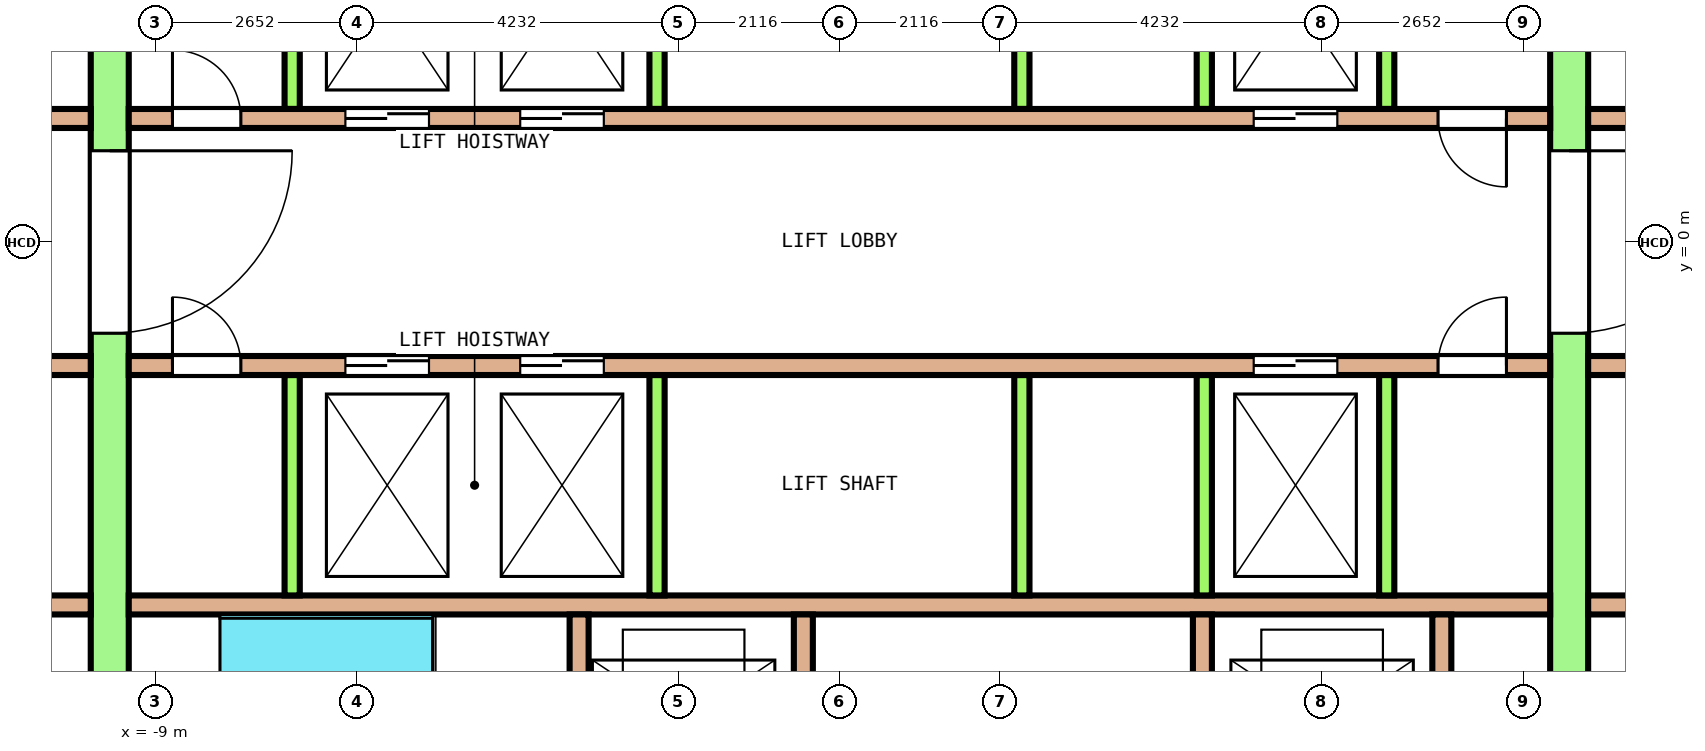
"""IFC4 building model, lengths in metres.
Left out: names, types, materials, properties, quantities, classifications, styles, units other than length and angle.
Written with IfcOpenShell. Run it as: python <this file> out.ifc"""

import sys

from ifc_helpers import new_model, si_unit, direction, frame, frame_2d, origin, place, context, subcontext, project, spatial, rectangle, extrude, element, fill, save


model = new_model("IFC4")
c1 = context("Model", 3, precision=1e-05, world=origin(), true_north=direction((0.0, 1.0)))
c2 = subcontext(c1, "Body", "Model", "MODEL_VIEW")
j1 = project(units=[si_unit("LENGTHUNIT", "METRE"), si_unit("PLANEANGLEUNIT", "RADIAN")], contexts=[c1])
p1 = place(None, origin())
s1 = spatial("IfcSite", under=j1, at=p1, CompositionType="ELEMENT")
p2 = place(p1, origin())
s2 = spatial("IfcBuilding", under=s1, at=p2, CompositionType="ELEMENT")
p3 = place(p2, frame((0.0, 0.0, 211.4)))
s3 = spatial("IfcBuildingStorey", under=s2, at=p3, CompositionType="ELEMENT", Elevation=211.4)
p4 = place(p3, frame((-9.6, -7.8, 0.0), z_axis=(0.0, 0.0, 1.0), x_axis=(0.0, 1.0, 0.0)))
e1 = element("IfcWall", 1, at=p4, inside=s3, PredefinedType="SHEAR", context=c2, shape_type="SweptSolid", body=[
    extrude(rectangle(XDim=15.6, YDim=0.5, at=frame_2d((7.8, 0.0))), origin(), (0.0, 0.0, 1.0), 3.7),
])
p5 = place(p4, frame((6.6, 0.0, 0.0)))
e2 = element("IfcOpeningElement", 2, at=p5, cuts=e1, PredefinedType="OPENING", context=c2, shape_type="SweptSolid", body=[
    extrude(rectangle(XDim=2.4, YDim=2.1, at=frame_2d((1.2, 1.05))), frame((0.0, 0.26, 0.0), z_axis=(0.0, -1.0, 0.0), x_axis=(1.0, 0.0, 0.0)), (0.0, 0.0, 1.0), 0.52),
])
p6 = place(p4, frame((13.5, 0.0, 0.0)))
e3 = element("IfcOpeningElement", 3, at=p6, cuts=e1, PredefinedType="OPENING", context=c2, shape_type="SweptSolid", body=[
    extrude(rectangle(XDim=1.2, YDim=2.1, at=frame_2d((0.6, 1.05))), frame((0.0, 0.26, 0.0), z_axis=(0.0, -1.0, 0.0), x_axis=(1.0, 0.0, 0.0)), (0.0, 0.0, 1.0), 0.52),
])
p7 = place(p4, frame((0.9, 0.0, 0.0)))
e4 = element("IfcOpeningElement", 4, at=p7, cuts=e1, PredefinedType="OPENING", context=c2, shape_type="SweptSolid", body=[
    extrude(rectangle(XDim=1.2, YDim=2.1, at=frame_2d((0.6, 1.05))), frame((0.0, 0.26, 0.0), z_axis=(0.0, -1.0, 0.0), x_axis=(1.0, 0.0, 0.0)), (0.0, 0.0, 1.0), 0.52),
])
p8 = place(p3, frame((9.6, -7.8, 0.0), z_axis=(0.0, 0.0, 1.0), x_axis=(0.0, 1.0, 0.0)))
e5 = element("IfcWall", 5, at=p8, inside=s3, PredefinedType="SHEAR", context=c2, shape_type="SweptSolid", body=[
    extrude(rectangle(XDim=15.6, YDim=0.5, at=frame_2d((7.8, 0.0))), origin(), (0.0, 0.0, 1.0), 3.7),
])
p9 = place(p8, frame((6.6, 0.0, 0.0)))
e6 = element("IfcOpeningElement", 6, at=p9, cuts=e5, PredefinedType="OPENING", context=c2, shape_type="SweptSolid", body=[
    extrude(rectangle(XDim=2.4, YDim=2.1, at=frame_2d((1.2, 1.05))), frame((0.0, 0.26, 0.0), z_axis=(0.0, -1.0, 0.0), x_axis=(1.0, 0.0, 0.0)), (0.0, 0.0, 1.0), 0.52),
])
p10 = place(p8, frame((13.5, 0.0, 0.0)))
e7 = element("IfcOpeningElement", 7, at=p10, cuts=e5, PredefinedType="OPENING", context=c2, shape_type="SweptSolid", body=[
    extrude(rectangle(XDim=1.2, YDim=2.1, at=frame_2d((0.6, 1.05))), frame((0.0, 0.26, 0.0), z_axis=(0.0, -1.0, 0.0), x_axis=(1.0, 0.0, 0.0)), (0.0, 0.0, 1.0), 0.52),
])
p11 = place(p8, frame((1.0, 0.0, 0.0)))
e8 = element("IfcOpeningElement", 8, at=p11, cuts=e5, PredefinedType="OPENING", context=c2, shape_type="SweptSolid", body=[
    extrude(rectangle(XDim=1.0, YDim=2.1, at=frame_2d((0.5, 1.05))), frame((0.0, 0.26, 0.0), z_axis=(0.0, -1.0, 0.0), x_axis=(1.0, 0.0, 0.0)), (0.0, 0.0, 1.0), 0.52),
])
p12 = place(p3, frame((-12.9, 1.625, 0.0), z_axis=(0.0, 0.0, 1.0), x_axis=(1.0, 0.0, 0.0)))
e9 = element("IfcWall", 9, at=p12, inside=s3, PredefinedType="SOLIDWALL", context=c2, shape_type="SweptSolid", body=[
    extrude(rectangle(XDim=3.05, YDim=0.25, at=frame_2d((1.525, 0.0))), origin(), (0.0, 0.0, 1.0), 3.7),
])
p13 = place(p12, frame((1.075, 0.0, 0.0)))
e10 = element("IfcOpeningElement", 10, at=p13, cuts=e9, PredefinedType="OPENING", context=c2, shape_type="SweptSolid", body=[
    extrude(rectangle(XDim=0.9, YDim=2.1, at=frame_2d((0.45, 1.05))), frame((0.0, 0.135, 0.0), z_axis=(0.0, -1.0, 0.0), x_axis=(1.0, 0.0, 0.0)), (0.0, 0.0, 1.0), 0.27),
])
p14 = place(p3, frame((-9.35, 1.625, 0.0), z_axis=(0.0, 0.0, 1.0), x_axis=(1.0, 0.0, 0.0)))
e11 = element("IfcWall", 11, at=p14, inside=s3, PredefinedType="SOLIDWALL", context=c2, shape_type="SweptSolid", body=[
    extrude(rectangle(XDim=18.7, YDim=0.25, at=frame_2d((9.35, 0.0))), origin(), (0.0, 0.0, 1.0), 3.7),
])
p15 = place(p14, frame((2.85, 0.0, 0.0)))
e12 = element("IfcOpeningElement", 12, at=p15, cuts=e11, PredefinedType="OPENING", context=c2, shape_type="SweptSolid", body=[
    extrude(rectangle(XDim=1.1, YDim=2.1, at=frame_2d((0.55, 1.05))), frame((0.0, 0.135, 0.0), z_axis=(0.0, -1.0, 0.0), x_axis=(1.0, 0.0, 0.0)), (0.0, 0.0, 1.0), 0.27),
])
p16 = place(p14, frame((5.15, 0.0, 0.0)))
e13 = element("IfcOpeningElement", 13, at=p16, cuts=e11, PredefinedType="OPENING", context=c2, shape_type="SweptSolid", body=[
    extrude(rectangle(XDim=1.1, YDim=2.1, at=frame_2d((0.55, 1.05))), frame((0.0, 0.135, 0.0), z_axis=(0.0, -1.0, 0.0), x_axis=(1.0, 0.0, 0.0)), (0.0, 0.0, 1.0), 0.27),
])
p17 = place(p14, frame((14.8, 0.0, 0.0)))
e14 = element("IfcOpeningElement", 14, at=p17, cuts=e11, PredefinedType="OPENING", context=c2, shape_type="SweptSolid", body=[
    extrude(rectangle(XDim=1.1, YDim=2.1, at=frame_2d((0.55, 1.05))), frame((0.0, 0.135, 0.0), z_axis=(0.0, -1.0, 0.0), x_axis=(1.0, 0.0, 0.0)), (0.0, 0.0, 1.0), 0.27),
])
p18 = place(p14, frame((0.575, 0.0, 0.0)))
e15 = element("IfcOpeningElement", 15, at=p18, cuts=e11, PredefinedType="OPENING", context=c2, shape_type="SweptSolid", body=[
    extrude(rectangle(XDim=0.9, YDim=2.1, at=frame_2d((0.45, 1.05))), frame((0.0, 0.135, 0.0), z_axis=(0.0, -1.0, 0.0), x_axis=(1.0, 0.0, 0.0)), (0.0, 0.0, 1.0), 0.27),
])
p19 = place(p14, frame((17.225, 0.0, 0.0)))
e16 = element("IfcOpeningElement", 16, at=p19, cuts=e11, PredefinedType="OPENING", context=c2, shape_type="SweptSolid", body=[
    extrude(rectangle(XDim=0.9, YDim=2.1, at=frame_2d((0.45, 1.05))), frame((0.0, 0.135, 0.0), z_axis=(0.0, -1.0, 0.0), x_axis=(1.0, 0.0, 0.0)), (0.0, 0.0, 1.0), 0.27),
])
p20 = place(p3, frame((9.85, 1.625, 0.0), z_axis=(0.0, 0.0, 1.0), x_axis=(1.0, 0.0, 0.0)))
e17 = element("IfcWall", 17, at=p20, inside=s3, PredefinedType="SOLIDWALL", context=c2, shape_type="SweptSolid", body=[
    extrude(rectangle(XDim=3.05, YDim=0.25, at=frame_2d((1.525, 0.0))), origin(), (0.0, 0.0, 1.0), 3.7),
])
p21 = place(p20, frame((1.075, 0.0, 0.0)))
e18 = element("IfcOpeningElement", 18, at=p21, cuts=e17, PredefinedType="OPENING", context=c2, shape_type="SweptSolid", body=[
    extrude(rectangle(XDim=0.9, YDim=2.1, at=frame_2d((0.45, 1.05))), frame((0.0, 0.135, 0.0), z_axis=(0.0, -1.0, 0.0), x_axis=(1.0, 0.0, 0.0)), (0.0, 0.0, 1.0), 0.27),
])
for number, where, z_axis, x_axis in (
    (19, (-7.2, 1.75, 0.0), (0.0, 0.0, 1.0), (0.0, 1.0, 0.0)),
    (20, (-2.4, 1.75, 0.0), (0.0, 0.0, 1.0), (0.0, 1.0, 0.0)),
    (21, (2.4, 1.75, 0.0), (0.0, 0.0, 1.0), (0.0, 1.0, 0.0)),
    (22, (4.8, 1.75, 0.0), (0.0, 0.0, 1.0), (0.0, 1.0, 0.0)),
    (23, (7.2, 1.75, 0.0), (0.0, 0.0, 1.0), (0.0, 1.0, 0.0)),
):
    element("IfcWall", number, at=place(p3, frame(where, z_axis=z_axis, x_axis=x_axis)), inside=s3, PredefinedType="SOLIDWALL", context=c2, shape_type="SweptSolid", body=[
        extrude(rectangle(XDim=2.9, YDim=0.2, at=frame_2d((1.45, 0.0))), origin(), (0.0, 0.0, 1.0), 3.7),
    ])
p22 = place(p3, frame((-12.9, -1.625, 0.0), z_axis=(0.0, 0.0, 1.0), x_axis=(1.0, 0.0, 0.0)))
e24 = element("IfcWall", 24, at=p22, inside=s3, PredefinedType="SOLIDWALL", context=c2, shape_type="SweptSolid", body=[
    extrude(rectangle(XDim=3.05, YDim=0.25, at=frame_2d((1.525, 0.0))), origin(), (0.0, 0.0, 1.0), 3.7),
])
p23 = place(p22, frame((1.075, 0.0, 0.0)))
e25 = element("IfcOpeningElement", 25, at=p23, cuts=e24, PredefinedType="OPENING", context=c2, shape_type="SweptSolid", body=[
    extrude(rectangle(XDim=0.9, YDim=2.1, at=frame_2d((0.45, 1.05))), frame((0.0, 0.135, 0.0), z_axis=(0.0, -1.0, 0.0), x_axis=(1.0, 0.0, 0.0)), (0.0, 0.0, 1.0), 0.27),
])
p24 = place(p3, frame((-9.35, -1.625, 0.0), z_axis=(0.0, 0.0, 1.0), x_axis=(1.0, 0.0, 0.0)))
e26 = element("IfcWall", 26, at=p24, inside=s3, PredefinedType="SOLIDWALL", context=c2, shape_type="SweptSolid", body=[
    extrude(rectangle(XDim=18.7, YDim=0.25, at=frame_2d((9.35, 0.0))), origin(), (0.0, 0.0, 1.0), 3.7),
])
p25 = place(p24, frame((2.85, 0.0, 0.0)))
e27 = element("IfcOpeningElement", 27, at=p25, cuts=e26, PredefinedType="OPENING", context=c2, shape_type="SweptSolid", body=[
    extrude(rectangle(XDim=1.1, YDim=2.1, at=frame_2d((0.55, 1.05))), frame((0.0, 0.135, 0.0), z_axis=(0.0, -1.0, 0.0), x_axis=(1.0, 0.0, 0.0)), (0.0, 0.0, 1.0), 0.27),
])
p26 = place(p24, frame((5.15, 0.0, 0.0)))
e28 = element("IfcOpeningElement", 28, at=p26, cuts=e26, PredefinedType="OPENING", context=c2, shape_type="SweptSolid", body=[
    extrude(rectangle(XDim=1.1, YDim=2.1, at=frame_2d((0.55, 1.05))), frame((0.0, 0.135, 0.0), z_axis=(0.0, -1.0, 0.0), x_axis=(1.0, 0.0, 0.0)), (0.0, 0.0, 1.0), 0.27),
])
p27 = place(p24, frame((14.8, 0.0, 0.0)))
e29 = element("IfcOpeningElement", 29, at=p27, cuts=e26, PredefinedType="OPENING", context=c2, shape_type="SweptSolid", body=[
    extrude(rectangle(XDim=1.1, YDim=2.1, at=frame_2d((0.55, 1.05))), frame((0.0, 0.135, 0.0), z_axis=(0.0, -1.0, 0.0), x_axis=(1.0, 0.0, 0.0)), (0.0, 0.0, 1.0), 0.27),
])
p28 = place(p24, frame((0.575, 0.0, 0.0)))
e30 = element("IfcOpeningElement", 30, at=p28, cuts=e26, PredefinedType="OPENING", context=c2, shape_type="SweptSolid", body=[
    extrude(rectangle(XDim=0.9, YDim=2.1, at=frame_2d((0.45, 1.05))), frame((0.0, 0.135, 0.0), z_axis=(0.0, -1.0, 0.0), x_axis=(1.0, 0.0, 0.0)), (0.0, 0.0, 1.0), 0.27),
])
p29 = place(p24, frame((17.225, 0.0, 0.0)))
e31 = element("IfcOpeningElement", 31, at=p29, cuts=e26, PredefinedType="OPENING", context=c2, shape_type="SweptSolid", body=[
    extrude(rectangle(XDim=0.9, YDim=2.1, at=frame_2d((0.45, 1.05))), frame((0.0, 0.135, 0.0), z_axis=(0.0, -1.0, 0.0), x_axis=(1.0, 0.0, 0.0)), (0.0, 0.0, 1.0), 0.27),
])
p30 = place(p3, frame((9.85, -1.625, 0.0), z_axis=(0.0, 0.0, 1.0), x_axis=(1.0, 0.0, 0.0)))
e32 = element("IfcWall", 32, at=p30, inside=s3, PredefinedType="SOLIDWALL", context=c2, shape_type="SweptSolid", body=[
    extrude(rectangle(XDim=3.05, YDim=0.25, at=frame_2d((1.525, 0.0))), origin(), (0.0, 0.0, 1.0), 3.7),
])
p31 = place(p30, frame((1.075, 0.0, 0.0)))
e33 = element("IfcOpeningElement", 33, at=p31, cuts=e32, PredefinedType="OPENING", context=c2, shape_type="SweptSolid", body=[
    extrude(rectangle(XDim=0.9, YDim=2.1, at=frame_2d((0.45, 1.05))), frame((0.0, 0.135, 0.0), z_axis=(0.0, -1.0, 0.0), x_axis=(1.0, 0.0, 0.0)), (0.0, 0.0, 1.0), 0.27),
])
p32 = place(p3, frame((-12.9, -4.775, 0.0), z_axis=(0.0, 0.0, 1.0), x_axis=(1.0, 0.0, 0.0)))
e34 = element("IfcWall", 34, at=p32, inside=s3, PredefinedType="SOLIDWALL", context=c2, shape_type="SweptSolid", body=[
    extrude(rectangle(XDim=3.05, YDim=0.25, at=frame_2d((1.525, 0.0))), origin(), (0.0, 0.0, 1.0), 3.7),
])
p33 = place(p3, frame((-9.35, -4.775, 0.0), z_axis=(0.0, 0.0, 1.0), x_axis=(1.0, 0.0, 0.0)))
e35 = element("IfcWall", 35, at=p33, inside=s3, PredefinedType="SOLIDWALL", context=c2, shape_type="SweptSolid", body=[
    extrude(rectangle(XDim=18.7, YDim=0.25, at=frame_2d((9.35, 0.0))), origin(), (0.0, 0.0, 1.0), 3.7),
])
p34 = place(p3, frame((9.85, -4.775, 0.0), z_axis=(0.0, 0.0, 1.0), x_axis=(1.0, 0.0, 0.0)))
e36 = element("IfcWall", 36, at=p34, inside=s3, PredefinedType="SOLIDWALL", context=c2, shape_type="SweptSolid", body=[
    extrude(rectangle(XDim=3.05, YDim=0.25, at=frame_2d((1.525, 0.0))), origin(), (0.0, 0.0, 1.0), 3.7),
])
for number, where, z_axis, x_axis in (
    (37, (-7.2, -4.65, 0.0), (0.0, 0.0, 1.0), (0.0, 1.0, 0.0)),
    (38, (-2.4, -4.65, 0.0), (0.0, 0.0, 1.0), (0.0, 1.0, 0.0)),
    (39, (2.4, -4.65, 0.0), (0.0, 0.0, 1.0), (0.0, 1.0, 0.0)),
    (40, (4.8, -4.65, 0.0), (0.0, 0.0, 1.0), (0.0, 1.0, 0.0)),
    (41, (7.2, -4.65, 0.0), (0.0, 0.0, 1.0), (0.0, 1.0, 0.0)),
):
    element("IfcWall", number, at=place(p3, frame(where, z_axis=z_axis, x_axis=x_axis)), inside=s3, PredefinedType="SOLIDWALL", context=c2, shape_type="SweptSolid", body=[
        extrude(rectangle(XDim=2.9, YDim=0.2, at=frame_2d((1.45, 0.0))), origin(), (0.0, 0.0, 1.0), 3.7),
    ])
p35 = place(p3, frame((-3.425, -7.8, 0.0), z_axis=(0.0, 0.0, 1.0), x_axis=(0.0, 1.0, 0.0)))
e42 = element("IfcWall", 42, at=p35, inside=s3, PredefinedType="SOLIDWALL", context=c2, shape_type="SweptSolid", body=[
    extrude(rectangle(XDim=2.9, YDim=0.25, at=frame_2d((1.45, 0.0))), origin(), (0.0, 0.0, 1.0), 3.7),
])
p36 = place(p3, frame((-0.475, -7.8, 0.0), z_axis=(0.0, 0.0, 1.0), x_axis=(0.0, 1.0, 0.0)))
e43 = element("IfcWall", 43, at=p36, inside=s3, PredefinedType="SOLIDWALL", context=c2, shape_type="SweptSolid", body=[
    extrude(rectangle(XDim=2.9, YDim=0.25, at=frame_2d((1.45, 0.0))), origin(), (0.0, 0.0, 1.0), 3.7),
])
p37 = place(p36, frame((0.9, 0.0, 0.0)))
e44 = element("IfcOpeningElement", 44, at=p37, cuts=e43, PredefinedType="OPENING", context=c2, shape_type="SweptSolid", body=[
    extrude(rectangle(XDim=1.1, YDim=2.1, at=frame_2d((0.55, 1.05))), frame((0.0, 0.135, 0.0), z_axis=(0.0, -1.0, 0.0), x_axis=(1.0, 0.0, 0.0)), (0.0, 0.0, 1.0), 0.27),
])
p38 = place(p3, frame((4.775, -7.8, 0.0), z_axis=(0.0, 0.0, 1.0), x_axis=(0.0, 1.0, 0.0)))
e45 = element("IfcWall", 45, at=p38, inside=s3, PredefinedType="SOLIDWALL", context=c2, shape_type="SweptSolid", body=[
    extrude(rectangle(XDim=2.9, YDim=0.25, at=frame_2d((1.45, 0.0))), origin(), (0.0, 0.0, 1.0), 3.7),
])
p39 = place(p38, frame((0.9, 0.0, 0.0)))
e46 = element("IfcOpeningElement", 46, at=p39, cuts=e45, PredefinedType="OPENING", context=c2, shape_type="SweptSolid", body=[
    extrude(rectangle(XDim=1.1, YDim=2.1, at=frame_2d((0.55, 1.05))), frame((0.0, 0.135, 0.0), z_axis=(0.0, -1.0, 0.0), x_axis=(1.0, 0.0, 0.0)), (0.0, 0.0, 1.0), 0.27),
])
p40 = place(p3, frame((7.925, -7.8, 0.0), z_axis=(0.0, 0.0, 1.0), x_axis=(0.0, 1.0, 0.0)))
e47 = element("IfcWall", 47, at=p40, inside=s3, PredefinedType="SOLIDWALL", context=c2, shape_type="SweptSolid", body=[
    extrude(rectangle(XDim=2.9, YDim=0.25, at=frame_2d((1.45, 0.0))), origin(), (0.0, 0.0, 1.0), 3.7),
])
p41 = place(p15, origin())
e48 = element("IfcDoor", 48, at=p41, inside=s3, OperationType="DOUBLE_DOOR_SLIDING", PredefinedType="DOOR", context=c2, shape_type="SweptSolid", body=[
    extrude(rectangle(XDim=1.1, YDim=2.1, at=frame_2d((0.55, 1.05))), frame((0.0, 0.075, 0.0), z_axis=(0.0, -1.0, 0.0), x_axis=(1.0, 0.0, 0.0)), (0.0, 0.0, 1.0), 0.15),
])
fill(e12, e48)
p42 = place(p16, origin())
e49 = element("IfcDoor", 49, at=p42, inside=s3, OperationType="DOUBLE_DOOR_SLIDING", PredefinedType="DOOR", context=c2, shape_type="SweptSolid", body=[
    extrude(rectangle(XDim=1.1, YDim=2.1, at=frame_2d((0.55, 1.05))), frame((0.0, 0.075, 0.0), z_axis=(0.0, -1.0, 0.0), x_axis=(1.0, 0.0, 0.0)), (0.0, 0.0, 1.0), 0.15),
])
fill(e13, e49)
p43 = place(p17, origin())
e50 = element("IfcDoor", 50, at=p43, inside=s3, OperationType="DOUBLE_DOOR_SLIDING", PredefinedType="DOOR", context=c2, shape_type="SweptSolid", body=[
    extrude(rectangle(XDim=1.1, YDim=2.1, at=frame_2d((0.55, 1.05))), frame((0.0, 0.075, 0.0), z_axis=(0.0, -1.0, 0.0), x_axis=(1.0, 0.0, 0.0)), (0.0, 0.0, 1.0), 0.15),
])
fill(e14, e50)
p44 = place(p25, origin())
e51 = element("IfcDoor", 51, at=p44, inside=s3, OperationType="DOUBLE_DOOR_SLIDING", PredefinedType="DOOR", context=c2, shape_type="SweptSolid", body=[
    extrude(rectangle(XDim=1.1, YDim=2.1, at=frame_2d((0.55, 1.05))), frame((0.0, 0.075, 0.0), z_axis=(0.0, -1.0, 0.0), x_axis=(1.0, 0.0, 0.0)), (0.0, 0.0, 1.0), 0.15),
])
fill(e27, e51)
p45 = place(p26, origin())
e52 = element("IfcDoor", 52, at=p45, inside=s3, OperationType="DOUBLE_DOOR_SLIDING", PredefinedType="DOOR", context=c2, shape_type="SweptSolid", body=[
    extrude(rectangle(XDim=1.1, YDim=2.1, at=frame_2d((0.55, 1.05))), frame((0.0, 0.075, 0.0), z_axis=(0.0, -1.0, 0.0), x_axis=(1.0, 0.0, 0.0)), (0.0, 0.0, 1.0), 0.15),
])
fill(e28, e52)
p46 = place(p27, origin())
e53 = element("IfcDoor", 53, at=p46, inside=s3, OperationType="DOUBLE_DOOR_SLIDING", PredefinedType="DOOR", context=c2, shape_type="SweptSolid", body=[
    extrude(rectangle(XDim=1.1, YDim=2.1, at=frame_2d((0.55, 1.05))), frame((0.0, 0.075, 0.0), z_axis=(0.0, -1.0, 0.0), x_axis=(1.0, 0.0, 0.0)), (0.0, 0.0, 1.0), 0.15),
])
fill(e29, e53)
p47 = place(p5, origin())
e54 = element("IfcDoor", 54, at=p47, inside=s3, OperationType="DOUBLE_DOOR_SINGLE_SWING", PredefinedType="DOOR", context=c2, shape_type="SweptSolid", body=[
    extrude(rectangle(XDim=2.4, YDim=2.1, at=frame_2d((1.2, 1.05))), frame((0.0, 0.2, 0.0), z_axis=(0.0, -1.0, 0.0), x_axis=(1.0, 0.0, 0.0)), (0.0, 0.0, 1.0), 0.4),
])
fill(e2, e54)
p48 = place(p9, origin())
e55 = element("IfcDoor", 55, at=p48, inside=s3, OperationType="DOUBLE_DOOR_SINGLE_SWING", PredefinedType="DOOR", context=c2, shape_type="SweptSolid", body=[
    extrude(rectangle(XDim=2.4, YDim=2.1, at=frame_2d((1.2, 1.05))), frame((0.0, 0.2, 0.0), z_axis=(0.0, -1.0, 0.0), x_axis=(1.0, 0.0, 0.0)), (0.0, 0.0, 1.0), 0.4),
])
fill(e6, e55)
p49 = place(p18, origin())
e56 = element("IfcDoor", 56, at=p49, inside=s3, OperationType="SINGLE_SWING_LEFT", PredefinedType="DOOR", context=c2, shape_type="SweptSolid", body=[
    extrude(rectangle(XDim=0.9, YDim=2.1, at=frame_2d((0.45, 1.05))), frame((0.0, 0.075, 0.0), z_axis=(0.0, -1.0, 0.0), x_axis=(1.0, 0.0, 0.0)), (0.0, 0.0, 1.0), 0.15),
])
fill(e15, e56)
p50 = place(p19, origin())
e57 = element("IfcDoor", 57, at=p50, inside=s3, OperationType="SINGLE_SWING_RIGHT", PredefinedType="DOOR", context=c2, shape_type="SweptSolid", body=[
    extrude(rectangle(XDim=0.9, YDim=2.1, at=frame_2d((0.45, 1.05))), frame((0.0, 0.075, 0.0), z_axis=(0.0, -1.0, 0.0), x_axis=(1.0, 0.0, 0.0)), (0.0, 0.0, 1.0), 0.15),
])
fill(e16, e57)
p51 = place(p28, origin())
e58 = element("IfcDoor", 58, at=p51, inside=s3, OperationType="SINGLE_SWING_LEFT", PredefinedType="DOOR", context=c2, shape_type="SweptSolid", body=[
    extrude(rectangle(XDim=0.9, YDim=2.1, at=frame_2d((0.45, 1.05))), frame((0.0, 0.075, 0.0), z_axis=(0.0, -1.0, 0.0), x_axis=(1.0, 0.0, 0.0)), (0.0, 0.0, 1.0), 0.15),
])
fill(e30, e58)
p52 = place(p29, origin())
e59 = element("IfcDoor", 59, at=p52, inside=s3, OperationType="SINGLE_SWING_RIGHT", PredefinedType="DOOR", context=c2, shape_type="SweptSolid", body=[
    extrude(rectangle(XDim=0.9, YDim=2.1, at=frame_2d((0.45, 1.05))), frame((0.0, 0.075, 0.0), z_axis=(0.0, -1.0, 0.0), x_axis=(1.0, 0.0, 0.0)), (0.0, 0.0, 1.0), 0.15),
])
fill(e31, e59)
save(model, sys.argv[1])
